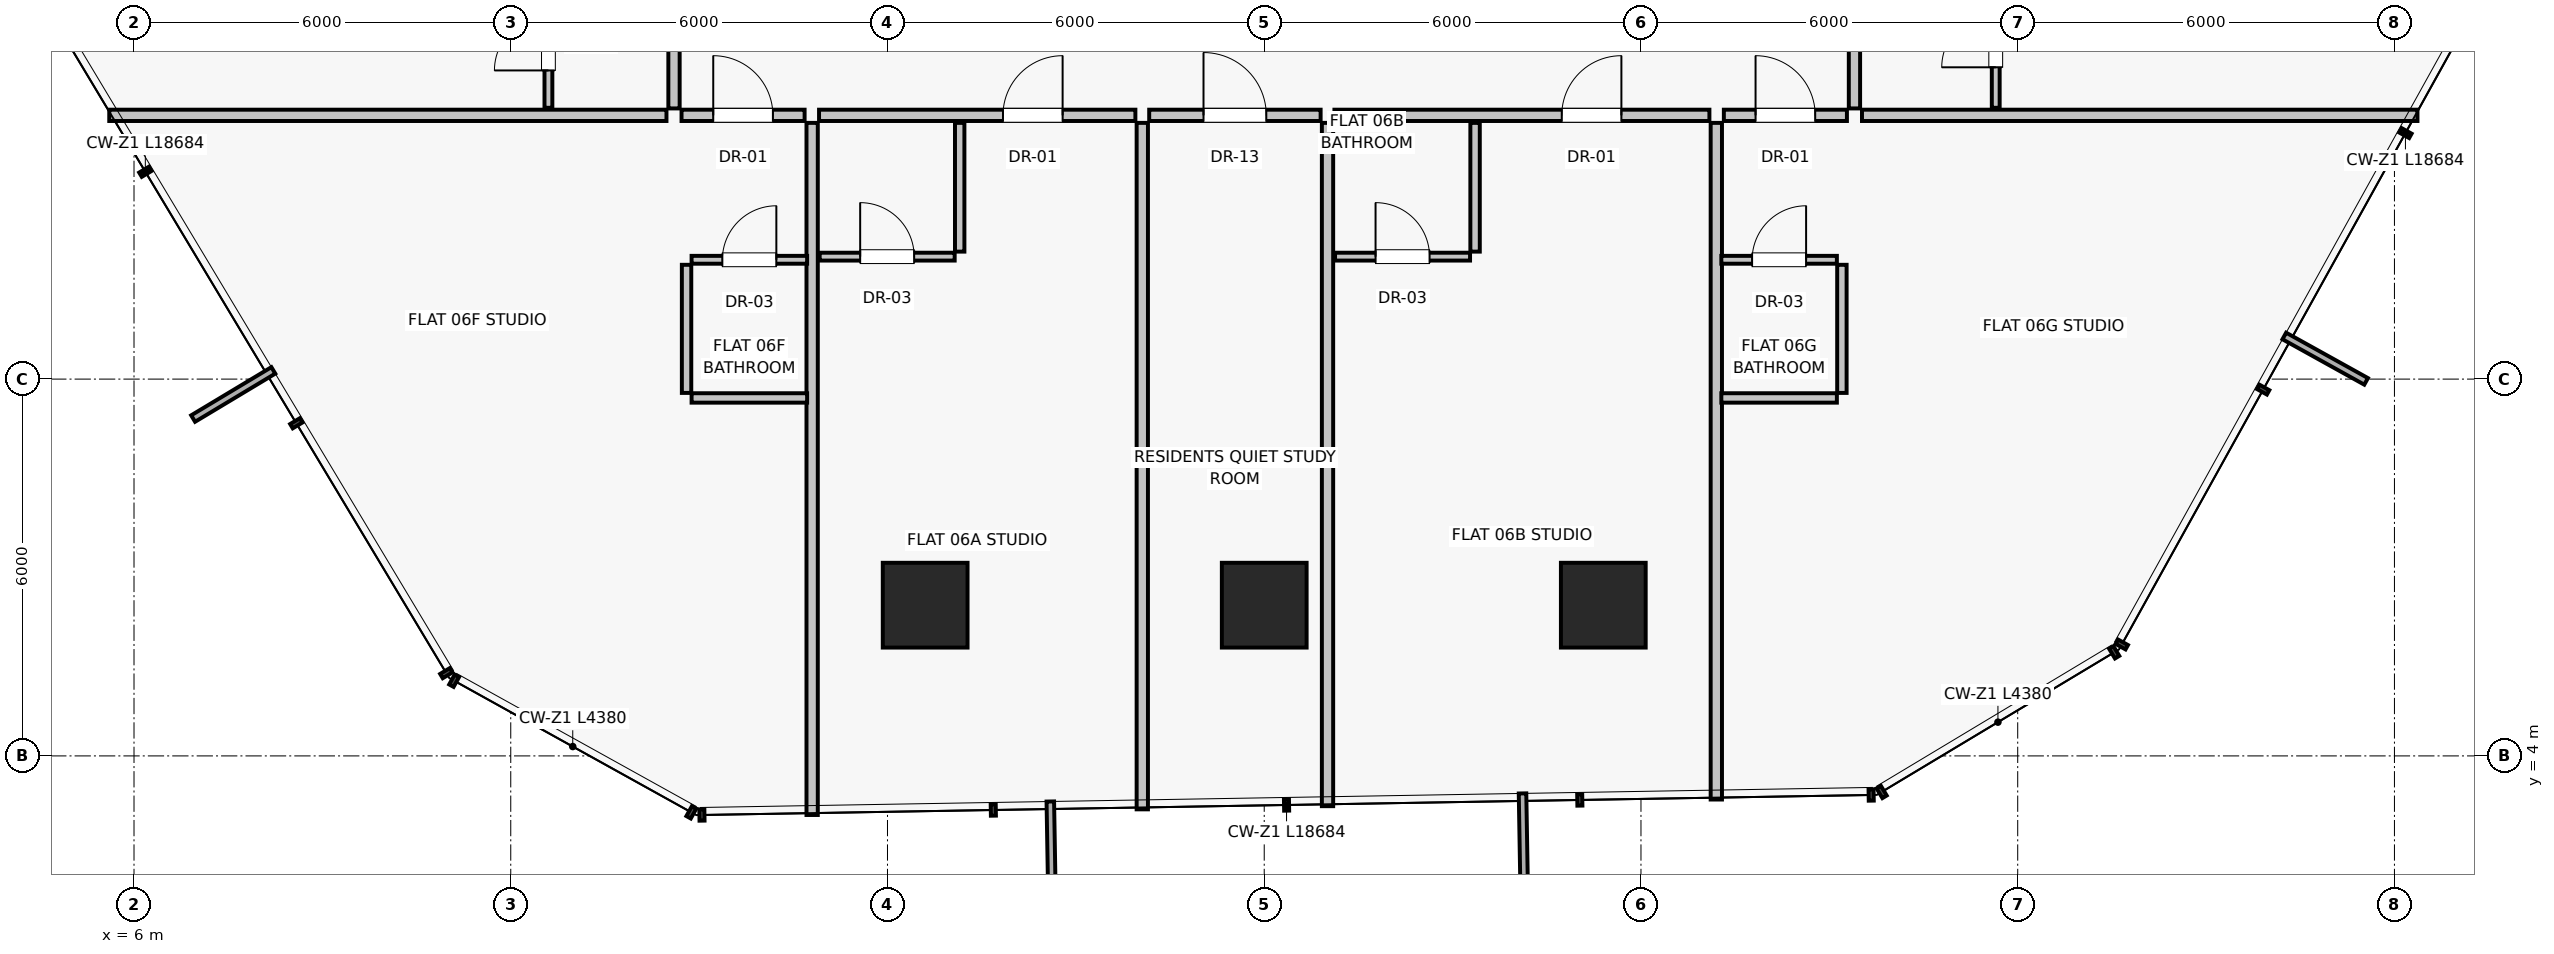
"""IFC4 building model, lengths in metres.
Left out: names, types, materials, properties, quantities, classifications, styles, units other than length and angle.
Written with IfcOpenShell. Run it as: python <this file> out.ifc"""

import sys

from ifc_helpers import new_model, si_unit, direction, frame, frame_2d, origin, origin_2d, place, context, subcontext, project, spatial, rectangle, extrude, source, transform, mapped, element, fill, save


model = new_model("IFC4")
c1 = context("Model", 3, precision=1e-05, world=origin(), true_north=direction((0.0, 1.0)))
c2 = subcontext(c1, "Body", "Model", "MODEL_VIEW")
j1 = project(units=[si_unit("LENGTHUNIT", "METRE"), si_unit("PLANEANGLEUNIT", "RADIAN")], contexts=[c1])
p1 = place(None, origin())
s1 = spatial("IfcSite", under=j1, at=p1, CompositionType="ELEMENT")
p2 = place(p1, origin())
s2 = spatial("IfcBuilding", under=s1, at=p2, CompositionType="ELEMENT")
p3 = place(p2, frame((0.0, 0.0, 27.3)))
s3 = spatial("IfcBuildingStorey", under=s2, at=p3, CompositionType="ELEMENT", Elevation=27.3)
for number, where, z_axis, x_axis in (
    (1, (18.6, 6.4, 0.0), (0.0, 0.0, 1.0), (1.0, 0.0, 0.0)),
    (2, (24.0, 6.4, 0.0), (0.0, 0.0, 1.0), (1.0, 0.0, 0.0)),
    (3, (29.4, 6.4, 0.0), (0.0, 0.0, 1.0), (1.0, 0.0, 0.0)),
):
    element("IfcColumn", number, at=place(p3, frame(where, z_axis=z_axis, x_axis=x_axis)), inside=s3, PredefinedType="COLUMN", context=c2, shape_type="SweptSolid", body=[
        extrude(rectangle(XDim=1.35, YDim=1.35, at=origin_2d()), origin(), (0.0, 0.0, 1.0), 3.25),
    ])
p4 = place(p3, frame((16.8, 14.08, 0.0), z_axis=(0.0, 0.0, 1.0), x_axis=(0.0, -1.0, 0.0)))
e4 = element("IfcWall", 4, at=p4, inside=s3, PredefinedType="PARTITIONING", context=c2, shape_type="SweptSolid", body=[
    extrude(rectangle(XDim=11.021, YDim=0.18, at=frame_2d((5.51, 0.0))), origin(), (0.0, 0.0, 1.0), 3.0),
])
p5 = place(p3, frame((31.2, 14.08, 0.0), z_axis=(0.0, 0.0, 1.0), x_axis=(0.0, -1.0, 0.0)))
e5 = element("IfcWall", 5, at=p5, inside=s3, PredefinedType="PARTITIONING", context=c2, shape_type="SweptSolid", body=[
    extrude(rectangle(XDim=10.775, YDim=0.18, at=frame_2d((5.387, 0.0))), origin(), (0.0, 0.0, 1.0), 3.0),
])
p6 = place(p3, frame((22.168, 14.2, 0.0), z_axis=(0.0, 0.0, 1.0), x_axis=(1.0, 0.0, 0.0)))
e6 = element("IfcWall", 6, at=p6, inside=s3, PredefinedType="PARTITIONING", context=c2, shape_type="SweptSolid", body=[
    extrude(rectangle(XDim=2.73, YDim=0.18, at=frame_2d((1.365, 0.0))), origin(), (0.0, 0.0, 1.0), 3.0),
])
p7 = place(p6, frame((0.865, 0.0, 0.0)))
e7 = element("IfcOpeningElement", 7, at=p7, cuts=e6, PredefinedType="OPENING", context=c2, shape_type="SweptSolid", body=[
    extrude(rectangle(XDim=1.0, YDim=2.01, at=frame_2d((0.5, 1.005))), frame((0.0, 0.1, 0.0), z_axis=(0.0, -1.0, 0.0), x_axis=(1.0, 0.0, 0.0)), (0.0, 0.0, 1.0), 0.2),
])
p8 = place(p3, frame((22.058, 14.08, 0.0), z_axis=(0.0, 0.0, 1.0), x_axis=(0.0, -1.0, 0.0)))
e8 = element("IfcWall", 8, at=p8, inside=s3, PredefinedType="PARTITIONING", context=c2, shape_type="SweptSolid", body=[
    extrude(rectangle(XDim=10.931, YDim=0.18, at=frame_2d((5.465, 0.0))), origin(), (0.0, 0.0, 1.0), 3.0),
])
p9 = place(p3, frame((16.91, 14.2, 0.0), z_axis=(0.0, 0.0, 1.0), x_axis=(1.0, 0.0, 0.0)))
e9 = element("IfcWall", 9, at=p9, inside=s3, PredefinedType="PARTITIONING", context=c2, shape_type="SweptSolid", body=[
    extrude(rectangle(XDim=5.038, YDim=0.18, at=frame_2d((2.519, 0.0))), origin(), (0.0, 0.0, 1.0), 3.0),
])
p10 = place(p9, frame((2.929, 0.0, 0.0)))
e10 = element("IfcOpeningElement", 10, at=p10, cuts=e9, PredefinedType="OPENING", context=c2, shape_type="SweptSolid", body=[
    extrude(rectangle(XDim=0.95, YDim=2.02, at=frame_2d((0.475, 1.01))), frame((0.0, 0.1, 0.0), z_axis=(0.0, -1.0, 0.0), x_axis=(1.0, 0.0, 0.0)), (0.0, 0.0, 1.0), 0.2),
])
p11 = place(p3, frame((19.15, 14.08, 0.0), z_axis=(0.0, 0.0, 1.0), x_axis=(0.0, -1.0, 0.0)))
e11 = element("IfcWall", 11, at=p11, inside=s3, PredefinedType="PARTITIONING", context=c2, shape_type="SweptSolid", body=[
    extrude(rectangle(XDim=2.05, YDim=0.15, at=frame_2d((1.025, 0.0))), origin(), (0.0, 0.0, 1.0), 3.0),
])
p12 = place(p3, frame((16.92, 11.95, 0.0), z_axis=(0.0, 0.0, 1.0), x_axis=(1.0, 0.0, 0.0)))
e12 = element("IfcWall", 12, at=p12, inside=s3, PredefinedType="PARTITIONING", context=c2, shape_type="SweptSolid", body=[
    extrude(rectangle(XDim=2.15, YDim=0.125, at=frame_2d((1.075, 0.0))), origin(), (0.0, 0.0, 1.0), 2.58),
])
p13 = place(p12, frame((0.645, 0.0, 0.0)))
e13 = element("IfcOpeningElement", 13, at=p13, cuts=e12, PredefinedType="OPENING", context=c2, shape_type="SweptSolid", body=[
    extrude(rectangle(XDim=0.86, YDim=2.01, at=frame_2d((0.43, 1.005))), frame((0.0, 0.073, 0.0), z_axis=(0.0, -1.0, 0.0), x_axis=(1.0, 0.0, 0.0)), (0.0, 0.0, 1.0), 0.145),
])
p14 = place(p3, frame((25.008, 14.08, 0.0), z_axis=(0.0, 0.0, 1.0), x_axis=(0.0, -1.0, 0.0)))
e14 = element("IfcWall", 14, at=p14, inside=s3, PredefinedType="PARTITIONING", context=c2, shape_type="SweptSolid", body=[
    extrude(rectangle(XDim=10.88, YDim=0.18, at=frame_2d((5.44, 0.0))), origin(), (0.0, 0.0, 1.0), 3.0),
])
p15 = place(p3, frame((25.118, 14.2, 0.0), z_axis=(0.0, 0.0, 1.0), x_axis=(1.0, 0.0, 0.0)))
e15 = element("IfcWall", 15, at=p15, inside=s3, PredefinedType="PARTITIONING", context=c2, shape_type="SweptSolid", body=[
    extrude(rectangle(XDim=5.972, YDim=0.18, at=frame_2d((2.986, 0.0))), origin(), (0.0, 0.0, 1.0), 3.0),
])
p16 = place(p15, frame((3.62, 0.0, 0.0)))
e16 = element("IfcOpeningElement", 16, at=p16, cuts=e15, PredefinedType="OPENING", context=c2, shape_type="SweptSolid", body=[
    extrude(rectangle(XDim=0.95, YDim=2.02, at=frame_2d((0.475, 1.01))), frame((0.0, 0.1, 0.0), z_axis=(0.0, -1.0, 0.0), x_axis=(1.0, 0.0, 0.0)), (0.0, 0.0, 1.0), 0.2),
])
p17 = place(p3, frame((27.358, 14.08, 0.0), z_axis=(0.0, 0.0, 1.0), x_axis=(0.0, -1.0, 0.0)))
e17 = element("IfcWall", 17, at=p17, inside=s3, PredefinedType="PARTITIONING", context=c2, shape_type="SweptSolid", body=[
    extrude(rectangle(XDim=2.05, YDim=0.15, at=frame_2d((1.025, 0.0))), origin(), (0.0, 0.0, 1.0), 3.0),
])
p18 = place(p3, frame((25.128, 11.95, 0.0), z_axis=(0.0, 0.0, 1.0), x_axis=(1.0, 0.0, 0.0)))
e18 = element("IfcWall", 18, at=p18, inside=s3, PredefinedType="PARTITIONING", context=c2, shape_type="SweptSolid", body=[
    extrude(rectangle(XDim=2.15, YDim=0.125, at=frame_2d((1.075, 0.0))), origin(), (0.0, 0.0, 1.0), 2.58),
])
p19 = place(p18, frame((0.645, 0.0, 0.0)))
e19 = element("IfcOpeningElement", 19, at=p19, cuts=e18, PredefinedType="OPENING", context=c2, shape_type="SweptSolid", body=[
    extrude(rectangle(XDim=0.86, YDim=2.01, at=frame_2d((0.43, 1.005))), frame((0.0, 0.073, 0.0), z_axis=(0.0, -1.0, 0.0), x_axis=(1.0, 0.0, 0.0)), (0.0, 0.0, 1.0), 0.145),
])
p20 = place(p3, frame((14.48, 14.2, 0.0), z_axis=(0.0, 0.0, 1.0), x_axis=(-1.0, 0.0, 0.0)))
e20 = element("IfcWall", 20, at=p20, inside=s3, PredefinedType="PARTITIONING", context=c2, shape_type="SweptSolid", body=[
    extrude(rectangle(XDim=8.874, YDim=0.18, at=frame_2d((4.437, 0.0))), origin(), (0.0, 0.0, 1.0), 3.0),
])
p21 = place(p3, frame((14.6, 14.31, 0.0), z_axis=(0.0, 0.0, 1.0), x_axis=(0.0, 1.0, 0.0)))
e21 = element("IfcWall", 21, at=p21, inside=s3, PredefinedType="PARTITIONING", context=c2, shape_type="SweptSolid", body=[
    extrude(rectangle(XDim=11.808, YDim=0.18, at=frame_2d((5.904, 0.0))), origin(), (0.0, 0.0, 1.0), 3.0),
])
p22 = place(p21, frame((3.847, 0.0, 0.0)))
e22 = element("IfcOpeningElement", 22, at=p22, cuts=e21, PredefinedType="OPENING", context=c2, shape_type="SweptSolid", body=[
    extrude(rectangle(XDim=0.95, YDim=2.02, at=frame_2d((0.475, 1.01))), frame((0.0, 0.1, 0.0), z_axis=(0.0, -1.0, 0.0), x_axis=(1.0, 0.0, 0.0)), (0.0, 0.0, 1.0), 0.2),
])
p23 = place(p3, frame((12.6, 14.32, 0.0), z_axis=(0.0, 0.0, 1.0), x_axis=(0.0, 1.0, 0.0)))
e23 = element("IfcWall", 23, at=p23, inside=s3, PredefinedType="PARTITIONING", context=c2, shape_type="SweptSolid", body=[
    extrude(rectangle(XDim=2.05, YDim=0.125, at=frame_2d((1.025, 0.0))), origin(), (0.0, 0.0, 1.0), 3.0),
])
p24 = place(p23, frame((0.595, 0.0, 0.0)))
e24 = element("IfcOpeningElement", 24, at=p24, cuts=e23, PredefinedType="OPENING", context=c2, shape_type="SweptSolid", body=[
    extrude(rectangle(XDim=0.86, YDim=2.01, at=frame_2d((0.43, 1.005))), frame((0.0, 0.073, 0.0), z_axis=(0.0, -1.0, 0.0), x_axis=(1.0, 0.0, 0.0)), (0.0, 0.0, 1.0), 0.145),
])
p25 = place(p3, frame((33.52, 14.2, 0.0), z_axis=(0.0, 0.0, 1.0), x_axis=(1.0, 0.0, 0.0)))
e25 = element("IfcWall", 25, at=p25, inside=s3, PredefinedType="PARTITIONING", context=c2, shape_type="SweptSolid", body=[
    extrude(rectangle(XDim=8.846, YDim=0.18, at=frame_2d((4.423, 0.0))), origin(), (0.0, 0.0, 1.0), 3.0),
])
p26 = place(p3, frame((33.4, 14.31, 0.0), z_axis=(0.0, 0.0, 1.0), x_axis=(0.0, 1.0, 0.0)))
e26 = element("IfcWall", 26, at=p26, inside=s3, PredefinedType="PARTITIONING", context=c2, shape_type="SweptSolid", body=[
    extrude(rectangle(XDim=7.888, YDim=0.18, at=frame_2d((3.944, 0.0))), origin(), (0.0, 0.0, 1.0), 3.0),
])
p27 = place(p26, frame((5.038, 0.0, 0.0)))
e27 = element("IfcOpeningElement", 27, at=p27, cuts=e26, PredefinedType="OPENING", context=c2, shape_type="SweptSolid", body=[
    extrude(rectangle(XDim=0.95, YDim=2.02, at=frame_2d((0.475, 1.01))), frame((0.0, 0.1, 0.0), z_axis=(0.0, -1.0, 0.0), x_axis=(1.0, 0.0, 0.0)), (0.0, 0.0, 1.0), 0.2),
])
p28 = place(p3, frame((35.65, 14.32, 0.0), z_axis=(0.0, 0.0, 1.0), x_axis=(0.0, 1.0, 0.0)))
e28 = element("IfcWall", 28, at=p28, inside=s3, PredefinedType="PARTITIONING", context=c2, shape_type="SweptSolid", body=[
    extrude(rectangle(XDim=2.15, YDim=0.125, at=frame_2d((1.075, 0.0))), origin(), (0.0, 0.0, 1.0), 3.0),
])
p29 = place(p28, frame((0.645, 0.0, 0.0)))
e29 = element("IfcOpeningElement", 29, at=p29, cuts=e28, PredefinedType="OPENING", context=c2, shape_type="SweptSolid", body=[
    extrude(rectangle(XDim=0.86, YDim=2.01, at=frame_2d((0.43, 1.005))), frame((0.0, 0.073, 0.0), z_axis=(0.0, -1.0, 0.0), x_axis=(1.0, 0.0, 0.0)), (0.0, 0.0, 1.0), 0.145),
])
p30 = place(p3, frame((14.72, 14.2, 0.0), z_axis=(0.0, 0.0, 1.0), x_axis=(1.0, 0.0, 0.0)))
e30 = element("IfcWall", 30, at=p30, inside=s3, PredefinedType="PARTITIONING", context=c2, shape_type="SweptSolid", body=[
    extrude(rectangle(XDim=1.96, YDim=0.18, at=frame_2d((0.98, 0.0))), origin(), (0.0, 0.0, 1.0), 3.0),
])
p31 = place(p30, frame((0.505, 0.0, 0.0)))
e31 = element("IfcOpeningElement", 31, at=p31, cuts=e30, PredefinedType="OPENING", context=c2, shape_type="SweptSolid", body=[
    extrude(rectangle(XDim=0.95, YDim=2.02, at=frame_2d((0.475, 1.01))), frame((0.0, 0.1, 0.0), z_axis=(0.0, -1.0, 0.0), x_axis=(1.0, 0.0, 0.0)), (0.0, 0.0, 1.0), 0.2),
])
p32 = place(p3, frame((14.88, 11.9, 0.0), z_axis=(0.0, 0.0, 1.0), x_axis=(1.0, 0.0, 0.0)))
e32 = element("IfcWall", 32, at=p32, inside=s3, PredefinedType="PARTITIONING", context=c2, shape_type="SweptSolid", body=[
    extrude(rectangle(XDim=1.84, YDim=0.125, at=frame_2d((0.92, 0.0))), origin(), (0.0, 0.0, 1.0), 3.0),
])
p33 = place(p32, frame((0.49, 0.0, 0.0)))
e33 = element("IfcOpeningElement", 33, at=p33, cuts=e32, PredefinedType="OPENING", context=c2, shape_type="SweptSolid", body=[
    extrude(rectangle(XDim=0.86, YDim=2.01, at=frame_2d((0.43, 1.005))), frame((0.0, 0.073, 0.0), z_axis=(0.0, -1.0, 0.0), x_axis=(1.0, 0.0, 0.0)), (0.0, 0.0, 1.0), 0.145),
])
p34 = place(p3, frame((14.88, 9.7, 0.0), z_axis=(0.0, 0.0, 1.0), x_axis=(1.0, 0.0, 0.0)))
e34 = element("IfcWall", 34, at=p34, inside=s3, PredefinedType="PARTITIONING", context=c2, shape_type="SweptSolid", body=[
    extrude(rectangle(XDim=1.84, YDim=0.15, at=frame_2d((0.92, 0.0))), origin(), (0.0, 0.0, 1.0), 3.0),
])
p35 = place(p3, frame((14.8, 9.78, 0.0), z_axis=(0.0, 0.0, 1.0), x_axis=(0.0, 1.0, 0.0)))
e35 = element("IfcWall", 35, at=p35, inside=s3, PredefinedType="PARTITIONING", context=c2, shape_type="SweptSolid", body=[
    extrude(rectangle(XDim=2.04, YDim=0.15, at=frame_2d((1.02, 0.0))), origin(), (0.0, 0.0, 1.0), 3.0),
])
p36 = place(p3, frame((31.32, 14.2, 0.0), z_axis=(0.0, 0.0, 1.0), x_axis=(1.0, 0.0, 0.0)))
e36 = element("IfcWall", 36, at=p36, inside=s3, PredefinedType="PARTITIONING", context=c2, shape_type="SweptSolid", body=[
    extrude(rectangle(XDim=1.96, YDim=0.18, at=frame_2d((0.98, 0.0))), origin(), (0.0, 0.0, 1.0), 3.0),
])
p37 = place(p36, frame((0.505, 0.0, 0.0)))
e37 = element("IfcOpeningElement", 37, at=p37, cuts=e36, PredefinedType="OPENING", context=c2, shape_type="SweptSolid", body=[
    extrude(rectangle(XDim=0.95, YDim=2.02, at=frame_2d((0.475, 1.01))), frame((0.0, 0.1, 0.0), z_axis=(0.0, -1.0, 0.0), x_axis=(1.0, 0.0, 0.0)), (0.0, 0.0, 1.0), 0.2),
])
p38 = place(p3, frame((31.28, 11.9, 0.0), z_axis=(0.0, 0.0, 1.0), x_axis=(1.0, 0.0, 0.0)))
e38 = element("IfcWall", 38, at=p38, inside=s3, PredefinedType="PARTITIONING", context=c2, shape_type="SweptSolid", body=[
    extrude(rectangle(XDim=1.84, YDim=0.125, at=frame_2d((0.92, 0.0))), origin(), (0.0, 0.0, 1.0), 3.0),
])
p39 = place(p38, frame((0.49, 0.0, 0.0)))
e39 = element("IfcOpeningElement", 39, at=p39, cuts=e38, PredefinedType="OPENING", context=c2, shape_type="SweptSolid", body=[
    extrude(rectangle(XDim=0.86, YDim=2.01, at=frame_2d((0.43, 1.005))), frame((0.0, 0.073, 0.0), z_axis=(0.0, -1.0, 0.0), x_axis=(1.0, 0.0, 0.0)), (0.0, 0.0, 1.0), 0.145),
])
p40 = place(p3, frame((31.28, 9.7, 0.0), z_axis=(0.0, 0.0, 1.0), x_axis=(1.0, 0.0, 0.0)))
e40 = element("IfcWall", 40, at=p40, inside=s3, PredefinedType="PARTITIONING", context=c2, shape_type="SweptSolid", body=[
    extrude(rectangle(XDim=1.84, YDim=0.15, at=frame_2d((0.92, 0.0))), origin(), (0.0, 0.0, 1.0), 3.0),
])
p41 = place(p3, frame((33.2, 9.78, 0.0), z_axis=(0.0, 0.0, 1.0), x_axis=(0.0, 1.0, 0.0)))
e41 = element("IfcWall", 41, at=p41, inside=s3, PredefinedType="PARTITIONING", context=c2, shape_type="SweptSolid", body=[
    extrude(rectangle(XDim=2.04, YDim=0.15, at=frame_2d((1.02, 0.0))), origin(), (0.0, 0.0, 1.0), 3.0),
])
m1 = source(origin(), c2, "Body", "SweptSolid", [
    extrude(rectangle(XDim=1.0, YDim=2.01, at=frame_2d((0.5, 1.005))), frame((0.0, 0.025, 0.0), z_axis=(0.0, -1.0, 0.0), x_axis=(1.0, 0.0, 0.0)), (0.0, 0.0, 1.0), 0.05),
])
p42 = place(p7, origin())
e42 = element("IfcDoor", 42, at=p42, inside=s3, OperationType="SINGLE_SWING_LEFT", PredefinedType="DOOR", context=c2, shape_type="MappedRepresentation", body=[
    mapped(m1, transform((0.0, 0.0, 0.0), scale=1.0)),
])
fill(e7, e42)
m2 = source(origin(), c2, "Body", "SweptSolid", [
    extrude(rectangle(XDim=0.95, YDim=2.02, at=frame_2d((0.475, 1.01))), frame((0.0, 0.025, 0.0), z_axis=(0.0, -1.0, 0.0), x_axis=(1.0, 0.0, 0.0)), (0.0, 0.0, 1.0), 0.05),
])
p43 = place(p10, origin())
e43 = element("IfcDoor", 43, at=p43, inside=s3, OperationType="SINGLE_SWING_RIGHT", PredefinedType="DOOR", context=c2, shape_type="MappedRepresentation", body=[
    mapped(m2, transform((0.0, 0.0, 0.0), scale=1.0)),
])
fill(e10, e43)
m3 = source(origin(), c2, "Body", "SweptSolid", [
    extrude(rectangle(XDim=0.86, YDim=2.01, at=frame_2d((0.43, 1.005))), frame((0.0, 0.025, 0.0), z_axis=(0.0, -1.0, 0.0), x_axis=(1.0, 0.0, 0.0)), (0.0, 0.0, 1.0), 0.05),
])
p44 = place(p13, origin())
e44 = element("IfcDoor", 44, at=p44, inside=s3, OperationType="SINGLE_SWING_LEFT", PredefinedType="DOOR", context=c2, shape_type="MappedRepresentation", body=[
    mapped(m3, transform((0.0, 0.0, 0.0), scale=1.0)),
])
fill(e13, e44)
p45 = place(p16, origin())
e45 = element("IfcDoor", 45, at=p45, inside=s3, OperationType="SINGLE_SWING_RIGHT", PredefinedType="DOOR", context=c2, shape_type="MappedRepresentation", body=[
    mapped(m2, transform((0.0, 0.0, 0.0), scale=1.0)),
])
fill(e16, e45)
p46 = place(p19, origin())
e46 = element("IfcDoor", 46, at=p46, inside=s3, OperationType="SINGLE_SWING_LEFT", PredefinedType="DOOR", context=c2, shape_type="MappedRepresentation", body=[
    mapped(m3, transform((0.0, 0.0, 0.0), scale=1.0)),
])
fill(e19, e46)
p47 = place(p24, origin())
e47 = element("IfcDoor", 47, at=p47, inside=s3, OperationType="SINGLE_SWING_LEFT", PredefinedType="DOOR", context=c2, shape_type="MappedRepresentation", body=[
    mapped(m3, transform((0.0, 0.0, 0.0), scale=1.0)),
])
fill(e24, e47)
p48 = place(p29, origin())
e48 = element("IfcDoor", 48, at=p48, inside=s3, OperationType="SINGLE_SWING_LEFT", PredefinedType="DOOR", context=c2, shape_type="MappedRepresentation", body=[
    mapped(m3, transform((0.0, 0.0, 0.0), scale=1.0)),
])
fill(e29, e48)
p49 = place(p31, origin())
e49 = element("IfcDoor", 49, at=p49, inside=s3, OperationType="SINGLE_SWING_LEFT", PredefinedType="DOOR", context=c2, shape_type="MappedRepresentation", body=[
    mapped(m2, transform((0.0, 0.0, 0.0), scale=1.0)),
])
fill(e31, e49)
p50 = place(p33, origin())
e50 = element("IfcDoor", 50, at=p50, inside=s3, OperationType="SINGLE_SWING_RIGHT", PredefinedType="DOOR", context=c2, shape_type="MappedRepresentation", body=[
    mapped(m3, transform((0.0, 0.0, 0.0), scale=1.0)),
])
fill(e33, e50)
p51 = place(p37, origin())
e51 = element("IfcDoor", 51, at=p51, inside=s3, OperationType="SINGLE_SWING_LEFT", PredefinedType="DOOR", context=c2, shape_type="MappedRepresentation", body=[
    mapped(m2, transform((0.0, 0.0, 0.0), scale=1.0)),
])
fill(e37, e51)
p52 = place(p39, origin())
e52 = element("IfcDoor", 52, at=p52, inside=s3, OperationType="SINGLE_SWING_RIGHT", PredefinedType="DOOR", context=c2, shape_type="MappedRepresentation", body=[
    mapped(m3, transform((0.0, 0.0, 0.0), scale=1.0)),
])
fill(e39, e52)
save(model, sys.argv[1])
